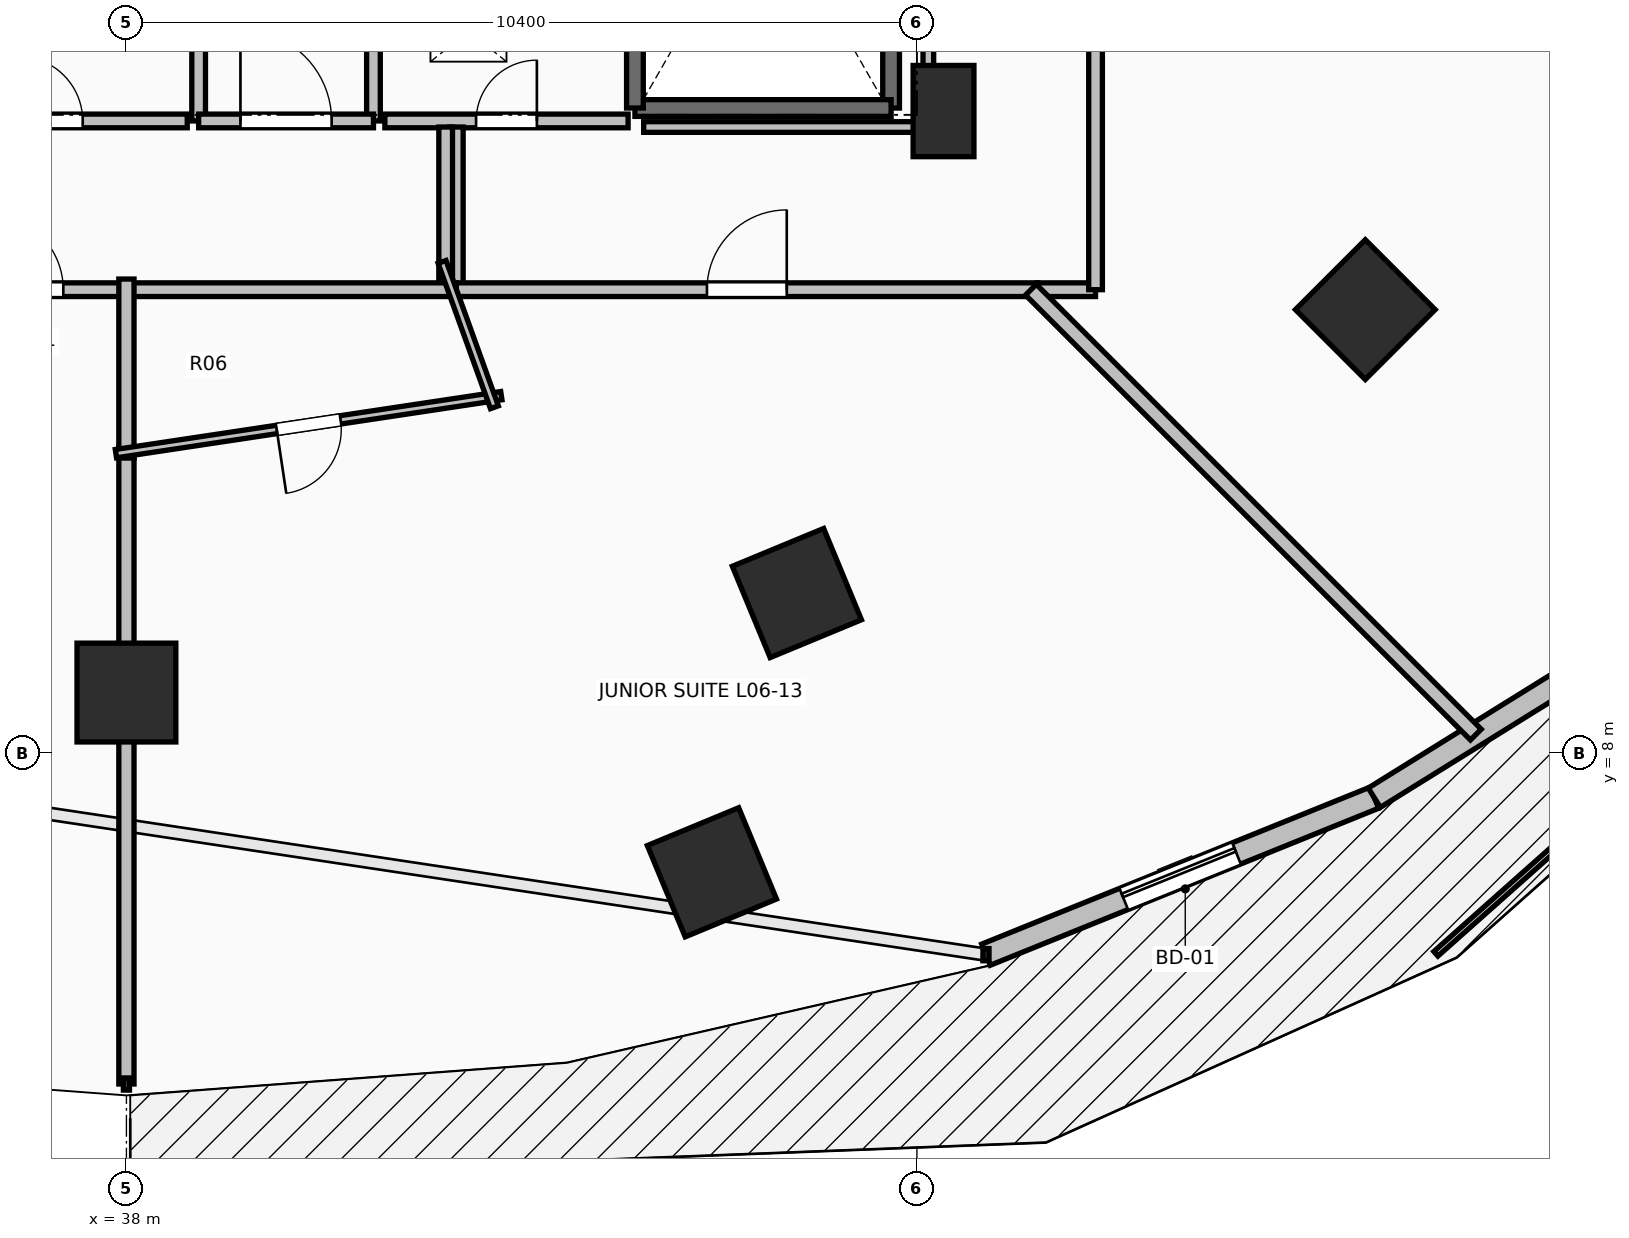
"""IFC4 building model, lengths in metres.
Left out: names, types, materials, properties, quantities, classifications, styles, units other than length and angle.
Written with IfcOpenShell. Run it as: python <this file> out.ifc"""

import sys

from ifc_helpers import new_model, si_unit, direction, frame, frame_2d, origin, origin_2d, place, context, subcontext, project, spatial, rectangle, extrude, element, fill, save


model = new_model("IFC4")
c1 = context("Model", 3, precision=1e-05, world=origin(), true_north=direction((0.0, 1.0)))
c2 = subcontext(c1, "Body", "Model", "MODEL_VIEW")
j1 = project(units=[si_unit("LENGTHUNIT", "METRE"), si_unit("PLANEANGLEUNIT", "RADIAN")], contexts=[c1])
p1 = place(None, origin())
s1 = spatial("IfcSite", under=j1, at=p1, CompositionType="ELEMENT")
p2 = place(p1, origin())
s2 = spatial("IfcBuilding", under=s1, at=p2, CompositionType="ELEMENT")
p3 = place(p2, frame((0.0, 0.0, 27.5)))
s3 = spatial("IfcBuildingStorey", under=s2, at=p3, CompositionType="ELEMENT", Elevation=27.5)
for number, where, z_axis, x_axis in (
    (1, (38.0, 8.8, 0.0), (0.0, 0.0, 1.0), (0.0, -1.0, 0.0)),
    (2, (46.821, 10.109, 0.0), (0.0, 0.0, 1.0), (0.383, -0.924, 0.0)),
    (3, (54.299, 13.838, 0.0), (0.0, 0.0, 1.0), (0.707, -0.707, 0.0)),
    (4, (45.703, 6.435, 0.0), (0.0, 0.0, 1.0), (0.383, -0.924, 0.0)),
):
    element("IfcColumn", number, at=place(p3, frame(where, z_axis=z_axis, x_axis=x_axis)), inside=s3, PredefinedType="COLUMN", context=c2, shape_type="SweptSolid", body=[
        extrude(rectangle(XDim=1.3, YDim=1.3, at=origin_2d()), origin(), (0.0, 0.0, 1.0), 3.5),
    ])
p4 = place(p3, frame((48.75, 16.45, 0.0), z_axis=(0.0, 0.0, 1.0), x_axis=(1.0, 0.0, 0.0)))
e5 = element("IfcColumn", 5, at=p4, inside=s3, PredefinedType="PILASTER", context=c2, shape_type="SweptSolid", body=[
    extrude(rectangle(XDim=0.8, YDim=1.2, at=origin_2d()), origin(), (0.0, 0.0, 1.0), 3.5),
])
p5 = place(p3, frame((49.308, 5.351, 0.0), z_axis=(0.0, 0.0, 1.0), x_axis=(0.927095325176, 0.374825636845, 0.0)))
e6 = element("IfcWall", 6, at=p5, inside=s3, PredefinedType="STANDARD", context=c2, shape_type="SweptSolid", body=[
    extrude(rectangle(XDim=5.51, YDim=0.3, at=frame_2d((2.755, 0.0))), origin(), (0.0, 0.0, 1.0), 3.24),
])
p6 = place(p5, frame((1.955, 0.0, 0.0)))
e7 = element("IfcOpeningElement", 7, at=p6, cuts=e6, PredefinedType="OPENING", context=c2, shape_type="SweptSolid", body=[
    extrude(rectangle(XDim=1.6, YDim=2.3, at=frame_2d((0.8, 1.15))), frame((0.0, 0.165, 0.0), z_axis=(0.0, -1.0, 0.0), x_axis=(1.0, 0.0, 0.0)), (0.0, 0.0, 1.0), 0.33),
])
p7 = place(p3, frame((54.417, 7.417, 0.0), z_axis=(0.0, 0.0, 1.0), x_axis=(0.849633724826, 0.527373239404, 0.0)))
e8 = element("IfcWall", 8, at=p7, inside=s3, PredefinedType="STANDARD", context=c2, shape_type="SweptSolid", body=[
    extrude(rectangle(XDim=5.271, YDim=0.3, at=frame_2d((2.635, 0.0))), origin(), (0.0, 0.0, 1.0), 3.24),
])
p8 = place(p3, frame((48.06, 23.91, 0.0), z_axis=(0.0, 0.0, 1.0), x_axis=(0.0, -1.0, 0.0)))
e9 = element("IfcWall", 9, at=p8, inside=s3, PredefinedType="SOLIDWALL", context=c2, shape_type="SweptSolid", body=[
    extrude(rectangle(XDim=7.42, YDim=0.22, at=frame_2d((3.71, 0.0))), origin(), (0.0, 0.0, 1.0), 3.24),
])
p9 = place(p3, frame((48.06, 16.49, 0.0), z_axis=(0.0, 0.0, 1.0), x_axis=(-1.0, 0.0, 0.0)))
e10 = element("IfcWall", 10, at=p9, inside=s3, PredefinedType="SOLIDWALL", context=c2, shape_type="SweptSolid", body=[
    extrude(rectangle(XDim=3.37, YDim=0.22, at=frame_2d((1.685, 0.0))), origin(), (0.0, 0.0, 1.0), 3.24),
])
p10 = place(p3, frame((44.69, 16.49, 0.0), z_axis=(0.0, 0.0, 1.0), x_axis=(0.0, 1.0, 0.0)))
e11 = element("IfcWall", 11, at=p10, inside=s3, PredefinedType="SOLIDWALL", context=c2, shape_type="SweptSolid", body=[
    extrude(rectangle(XDim=7.42, YDim=0.22, at=frame_2d((3.71, 0.0))), origin(), (0.0, 0.0, 1.0), 3.24),
])
p11 = place(p3, frame((41.25, 16.32, 0.0), z_axis=(0.0, 0.0, 1.0), x_axis=(0.0, 1.0, 0.0)))
e12 = element("IfcWall", 12, at=p11, inside=s3, PredefinedType="PARTITIONING", context=c2, shape_type="SweptSolid", body=[
    extrude(rectangle(XDim=7.88, YDim=0.18, at=frame_2d((3.94, 0.0))), origin(), (0.0, 0.0, 1.0), 3.24),
])
p12 = place(p11, frame((3.54, 0.0, 0.0)))
e13 = element("IfcOpeningElement", 13, at=p12, cuts=e12, PredefinedType="OPENING", context=c2, shape_type="SweptSolid", body=[
    extrude(rectangle(XDim=0.8, YDim=2.05, at=frame_2d((0.4, 1.025))), frame((0.0, 0.105, 0.0), z_axis=(0.0, -1.0, 0.0), x_axis=(1.0, 0.0, 0.0)), (0.0, 0.0, 1.0), 0.21),
])
p13 = place(p3, frame((38.95, 21.755, 0.0), z_axis=(0.0, 0.0, 1.0), x_axis=(0.0, -1.0, 0.0)))
e14 = element("IfcWall", 14, at=p13, inside=s3, PredefinedType="PARTITIONING", context=c2, shape_type="SweptSolid", body=[
    extrude(rectangle(XDim=5.435, YDim=0.18, at=frame_2d((2.717, 0.0))), origin(), (0.0, 0.0, 1.0), 3.24),
])
p14 = place(p13, frame((2.292, 0.0, 0.0)))
e15 = element("IfcOpeningElement", 15, at=p14, cuts=e14, PredefinedType="OPENING", context=c2, shape_type="SweptSolid", body=[
    extrude(rectangle(XDim=0.85, YDim=2.1, at=frame_2d((0.425, 1.05))), frame((0.0, 0.105, 0.0), z_axis=(0.0, -1.0, 0.0), x_axis=(1.0, 0.0, 0.0)), (0.0, 0.0, 1.0), 0.21),
])
p15 = place(p3, frame((38.95, 16.32, 0.0), z_axis=(0.0, 0.0, 1.0), x_axis=(1.0, 0.0, 0.0)))
e16 = element("IfcWall", 16, at=p15, inside=s3, PredefinedType="PARTITIONING", context=c2, shape_type="SweptSolid", body=[
    extrude(rectangle(XDim=2.3, YDim=0.18, at=frame_2d((1.15, 0.0))), origin(), (0.0, 0.0, 1.0), 3.24),
])
p16 = place(p15, frame((0.55, 0.0, 0.0)))
e17 = element("IfcOpeningElement", 17, at=p16, cuts=e16, PredefinedType="OPENING", context=c2, shape_type="SweptSolid", body=[
    extrude(rectangle(XDim=1.2, YDim=2.15, at=frame_2d((0.6, 1.075))), frame((0.0, 0.105, 0.0), z_axis=(0.0, -1.0, 0.0), x_axis=(1.0, 0.0, 0.0)), (0.0, 0.0, 1.0), 0.21),
])
p17 = place(p3, frame((41.4, 16.32, 0.0), z_axis=(0.0, 0.0, 1.0), x_axis=(1.0, 0.0, 0.0)))
e18 = element("IfcWall", 18, at=p17, inside=s3, PredefinedType="PARTITIONING", context=c2, shape_type="SweptSolid", body=[
    extrude(rectangle(XDim=3.2, YDim=0.18, at=frame_2d((1.6, 0.0))), origin(), (0.0, 0.0, 1.0), 3.24),
])
p18 = place(p17, frame((1.2, 0.0, 0.0)))
e19 = element("IfcOpeningElement", 19, at=p18, cuts=e18, PredefinedType="OPENING", context=c2, shape_type="SweptSolid", body=[
    extrude(rectangle(XDim=0.8, YDim=2.05, at=frame_2d((0.4, 1.025))), frame((0.0, 0.105, 0.0), z_axis=(0.0, -1.0, 0.0), x_axis=(1.0, 0.0, 0.0)), (0.0, 0.0, 1.0), 0.21),
])
p19 = place(p3, frame((35.2, 16.32, 0.0), z_axis=(0.0, 0.0, 1.0), x_axis=(1.0, 0.0, 0.0)))
e20 = element("IfcWall", 20, at=p19, inside=s3, PredefinedType="PARTITIONING", context=c2, shape_type="SweptSolid", body=[
    extrude(rectangle(XDim=3.6, YDim=0.18, at=frame_2d((1.8, 0.0))), origin(), (0.0, 0.0, 1.0), 3.24),
])
p20 = place(p19, frame((1.375, 0.0, 0.0)))
e21 = element("IfcOpeningElement", 21, at=p20, cuts=e20, PredefinedType="OPENING", context=c2, shape_type="SweptSolid", body=[
    extrude(rectangle(XDim=0.85, YDim=2.1, at=frame_2d((0.425, 1.05))), frame((0.0, 0.105, 0.0), z_axis=(0.0, -1.0, 0.0), x_axis=(1.0, 0.0, 0.0)), (0.0, 0.0, 1.0), 0.21),
])
p21 = place(p3, frame((35.279, 14.1, 0.0), z_axis=(0.0, 0.0, 1.0), x_axis=(1.0, 0.0, 0.0)))
e22 = element("IfcWall", 22, at=p21, inside=s3, PredefinedType="PARTITIONING", context=c2, shape_type="SweptSolid", body=[
    extrude(rectangle(XDim=2.781, YDim=0.18, at=frame_2d((1.391, 0.0))), origin(), (0.0, 0.0, 1.0), 3.24),
])
p22 = place(p21, frame((0.89, 0.0, 0.0)))
e23 = element("IfcOpeningElement", 23, at=p22, cuts=e22, PredefinedType="OPENING", context=c2, shape_type="SweptSolid", body=[
    extrude(rectangle(XDim=1.0, YDim=2.15, at=frame_2d((0.5, 1.075))), frame((0.0, 0.105, 0.0), z_axis=(0.0, -1.0, 0.0), x_axis=(1.0, 0.0, 0.0)), (0.0, 0.0, 1.0), 0.21),
])
p23 = place(p3, frame((42.34, 16.24, 0.0), z_axis=(0.0, 0.0, 1.0), x_axis=(0.0, -1.0, 0.0)))
e24 = element("IfcWall", 24, at=p23, inside=s3, PredefinedType="PARTITIONING", context=c2, shape_type="SweptSolid", body=[
    extrude(rectangle(XDim=2.14, YDim=0.18, at=frame_2d((1.07, 0.0))), origin(), (0.0, 0.0, 1.0), 3.24),
])
p24 = place(p3, frame((42.34, 14.1, 0.0), z_axis=(0.0, 0.0, 1.0), x_axis=(1.0, 0.0, 0.0)))
e25 = element("IfcWall", 25, at=p24, inside=s3, PredefinedType="PARTITIONING", context=c2, shape_type="SweptSolid", body=[
    extrude(rectangle(XDim=7.645, YDim=0.18, at=frame_2d((3.823, 0.0))), origin(), (0.0, 0.0, 1.0), 2.432),
])
p25 = place(p24, frame((3.298, 0.0, 0.0)))
e26 = element("IfcOpeningElement", 26, at=p25, cuts=e25, PredefinedType="OPENING", context=c2, shape_type="SweptSolid", body=[
    extrude(rectangle(XDim=1.05, YDim=2.2, at=frame_2d((0.525, 1.1))), frame((0.0, 0.105, 0.0), z_axis=(0.0, -1.0, 0.0), x_axis=(1.0, 0.0, 0.0)), (0.0, 0.0, 1.0), 0.21),
])
p26 = place(p3, frame((42.2, 14.157, 0.0), z_axis=(0.0, 0.0, 1.0), x_axis=(0.0, 1.0, 0.0)))
e27 = element("IfcWall", 27, at=p26, inside=s3, PredefinedType="PARTITIONING", context=c2, shape_type="SweptSolid", body=[
    extrude(rectangle(XDim=2.083, YDim=0.18, at=frame_2d((1.042, 0.0))), origin(), (0.0, 0.0, 1.0), 3.24),
])
p27 = place(p3, frame((37.92, 14.1, 0.0), z_axis=(0.0, 0.0, 1.0), x_axis=(1.0, 0.0, 0.0)))
e28 = element("IfcWall", 28, at=p27, inside=s3, PredefinedType="PARTITIONING", context=c2, shape_type="SweptSolid", body=[
    extrude(rectangle(XDim=4.42, YDim=0.18, at=frame_2d((2.21, 0.0))), origin(), (0.0, 0.0, 1.0), 3.24),
])
p28 = place(p3, frame((49.985, 14.1, 0.0), z_axis=(0.0, 0.0, 1.0), x_axis=(1.0, 0.0, 0.0)))
e29 = element("IfcWall", 29, at=p28, inside=s3, PredefinedType="PARTITIONING", context=c2, shape_type="SweptSolid", body=[
    extrude(rectangle(XDim=0.765, YDim=0.18, at=frame_2d((0.382, 0.0))), origin(), (0.0, 0.0, 1.0), 3.24),
])
p29 = place(p3, frame((50.75, 14.1, 0.0), z_axis=(0.0, 0.0, 1.0), x_axis=(0.0, 1.0, 0.0)))
e30 = element("IfcWall", 30, at=p29, inside=s3, PredefinedType="PARTITIONING", context=c2, shape_type="SweptSolid", body=[
    extrude(rectangle(XDim=11.7, YDim=0.18, at=frame_2d((5.85, 0.0))), origin(), (0.0, 0.0, 1.0), 2.432),
])
p30 = place(p29, frame((5.35, 0.0, 0.0)))
e31 = element("IfcOpeningElement", 31, at=p30, cuts=e30, PredefinedType="OPENING", context=c2, shape_type="SweptSolid", body=[
    extrude(rectangle(XDim=1.0, YDim=2.15, at=frame_2d((0.5, 1.075))), frame((0.0, 0.105, 0.0), z_axis=(0.0, -1.0, 0.0), x_axis=(1.0, 0.0, 0.0)), (0.0, 0.0, 1.0), 0.21),
])
p31 = place(p3, frame((38.0, 3.65, 0.0), z_axis=(0.0, 0.0, 1.0), x_axis=(0.0, 1.0, 0.0)))
e32 = element("IfcWall", 32, at=p31, inside=s3, PredefinedType="PARTITIONING", context=c2, shape_type="SweptSolid", body=[
    extrude(rectangle(XDim=8.375, YDim=0.2, at=frame_2d((4.188, 0.0))), origin(), (0.0, 0.0, 1.0), 2.432),
])
p32 = place(p3, frame((38.0, 11.885, 0.0), z_axis=(0.0, 0.0, 1.0), x_axis=(0.0, 1.0, 0.0)))
e33 = element("IfcWall", 33, at=p32, inside=s3, PredefinedType="PARTITIONING", context=c2, shape_type="SweptSolid", body=[
    extrude(rectangle(XDim=2.355, YDim=0.2, at=frame_2d((1.177, 0.0))), origin(), (0.0, 0.0, 1.0), 2.922),
])
p33 = place(p3, frame((42.932, 12.706, 0.0), z_axis=(0.0, 0.0, 1.0), x_axis=(-0.988876905643, -0.148736227888, 0.0)))
e34 = element("IfcWall", 34, at=p33, inside=s3, PredefinedType="PARTITIONING", context=c2, shape_type="SweptSolid", body=[
    extrude(rectangle(XDim=5.128, YDim=0.11, at=frame_2d((2.564, 0.0))), origin(), (0.0, 0.0, 1.0), 3.24),
])
p34 = place(p33, frame((2.139, 0.0, 0.0)))
e35 = element("IfcOpeningElement", 35, at=p34, cuts=e34, PredefinedType="OPENING", context=c2, shape_type="SweptSolid", body=[
    extrude(rectangle(XDim=0.85, YDim=2.1, at=frame_2d((0.425, 1.05))), frame((0.0, 0.07, 0.0), z_axis=(0.0, -1.0, 0.0), x_axis=(1.0, 0.0, 0.0)), (0.0, 0.0, 1.0), 0.14),
])
p35 = place(p3, frame((42.153, 14.466, 0.0), z_axis=(0.0, 0.0, 1.0), x_axis=(0.338800270412, -0.940858319179, 0.0)))
e36 = element("IfcWall", 36, at=p35, inside=s3, PredefinedType="PARTITIONING", context=c2, shape_type="SweptSolid", body=[
    extrude(rectangle(XDim=2.033, YDim=0.11, at=frame_2d((1.016, 0.0))), origin(), (0.0, 0.0, 1.0), 2.432),
])
p36 = place(p3, frame((55.753, 8.247, 0.0), z_axis=(0.0, 0.0, 1.0), x_axis=(-0.707106781187, 0.707106781187, 0.0)))
e37 = element("IfcWall", 37, at=p36, inside=s3, PredefinedType="PARTITIONING", context=c2, shape_type="SweptSolid", body=[
    extrude(rectangle(XDim=8.277, YDim=0.2, at=frame_2d((4.139, 0.0))), origin(), (0.0, 0.0, 1.0), 2.624),
])
p37 = place(p3, frame((48.55, 23.754, 0.0), z_axis=(0.0, 0.0, 1.0), x_axis=(0.0, -1.0, 0.0)))
e38 = element("IfcWall", 38, at=p37, inside=s3, PredefinedType="PARTITIONING", context=c2, shape_type="SweptSolid", body=[
    extrude(rectangle(XDim=7.514, YDim=0.14, at=frame_2d((3.757, 0.0))), origin(), (0.0, 0.0, 1.0), 2.432),
])
p38 = place(p3, frame((48.55, 16.24, 0.0), z_axis=(0.0, 0.0, 1.0), x_axis=(-1.0, 0.0, 0.0)))
e39 = element("IfcWall", 39, at=p38, inside=s3, PredefinedType="PARTITIONING", context=c2, shape_type="SweptSolid", body=[
    extrude(rectangle(XDim=3.745, YDim=0.14, at=frame_2d((1.873, 0.0))), origin(), (0.0, 0.0, 1.0), 2.432),
])
p39 = place(p6, origin())
e40 = element("IfcDoor", 40, at=p39, inside=s3, OperationType="SLIDING_TO_LEFT", PredefinedType="DOOR", context=c2, shape_type="SweptSolid", body=[
    extrude(rectangle(XDim=1.6, YDim=2.3, at=frame_2d((0.8, 1.15))), frame((0.0, 0.025, 0.0), z_axis=(0.0, -1.0, 0.0), x_axis=(1.0, 0.0, 0.0)), (0.0, 0.0, 1.0), 0.05),
])
fill(e7, e40)
p40 = place(p16, origin())
e41 = element("IfcDoor", 41, at=p40, inside=s3, OperationType="SINGLE_SWING_LEFT", PredefinedType="DOOR", context=c2, shape_type="SweptSolid", body=[
    extrude(rectangle(XDim=1.2, YDim=2.15, at=frame_2d((0.6, 1.075))), frame((0.0, 0.025, 0.0), z_axis=(0.0, -1.0, 0.0), x_axis=(1.0, 0.0, 0.0)), (0.0, 0.0, 1.0), 0.05),
])
fill(e17, e41)
p41 = place(p18, origin())
e42 = element("IfcDoor", 42, at=p41, inside=s3, OperationType="SINGLE_SWING_RIGHT", PredefinedType="DOOR", context=c2, shape_type="SweptSolid", body=[
    extrude(rectangle(XDim=0.8, YDim=2.05, at=frame_2d((0.4, 1.025))), frame((0.0, 0.025, 0.0), z_axis=(0.0, -1.0, 0.0), x_axis=(1.0, 0.0, 0.0)), (0.0, 0.0, 1.0), 0.05),
])
fill(e19, e42)
p42 = place(p20, origin())
e43 = element("IfcDoor", 43, at=p42, inside=s3, OperationType="SINGLE_SWING_LEFT", PredefinedType="DOOR", context=c2, shape_type="SweptSolid", body=[
    extrude(rectangle(XDim=0.85, YDim=2.1, at=frame_2d((0.425, 1.05))), frame((0.0, 0.025, 0.0), z_axis=(0.0, -1.0, 0.0), x_axis=(1.0, 0.0, 0.0)), (0.0, 0.0, 1.0), 0.05),
])
fill(e21, e43)
p43 = place(p22, origin())
e44 = element("IfcDoor", 44, at=p43, inside=s3, OperationType="SINGLE_SWING_LEFT", PredefinedType="DOOR", context=c2, shape_type="SweptSolid", body=[
    extrude(rectangle(XDim=1.0, YDim=2.15, at=frame_2d((0.5, 1.075))), frame((0.0, 0.025, 0.0), z_axis=(0.0, -1.0, 0.0), x_axis=(1.0, 0.0, 0.0)), (0.0, 0.0, 1.0), 0.05),
])
fill(e23, e44)
p44 = place(p25, origin())
e45 = element("IfcDoor", 45, at=p44, inside=s3, OperationType="SINGLE_SWING_RIGHT", PredefinedType="DOOR", context=c2, shape_type="SweptSolid", body=[
    extrude(rectangle(XDim=1.05, YDim=2.2, at=frame_2d((0.525, 1.1))), frame((0.0, 0.025, 0.0), z_axis=(0.0, -1.0, 0.0), x_axis=(1.0, 0.0, 0.0)), (0.0, 0.0, 1.0), 0.05),
])
fill(e26, e45)
p45 = place(p34, origin())
e46 = element("IfcDoor", 46, at=p45, inside=s3, OperationType="SINGLE_SWING_RIGHT", PredefinedType="DOOR", context=c2, shape_type="SweptSolid", body=[
    extrude(rectangle(XDim=0.85, YDim=2.1, at=frame_2d((0.425, 1.05))), frame((0.0, 0.025, 0.0), z_axis=(0.0, -1.0, 0.0), x_axis=(1.0, 0.0, 0.0)), (0.0, 0.0, 1.0), 0.05),
])
fill(e35, e46)
save(model, sys.argv[1])
